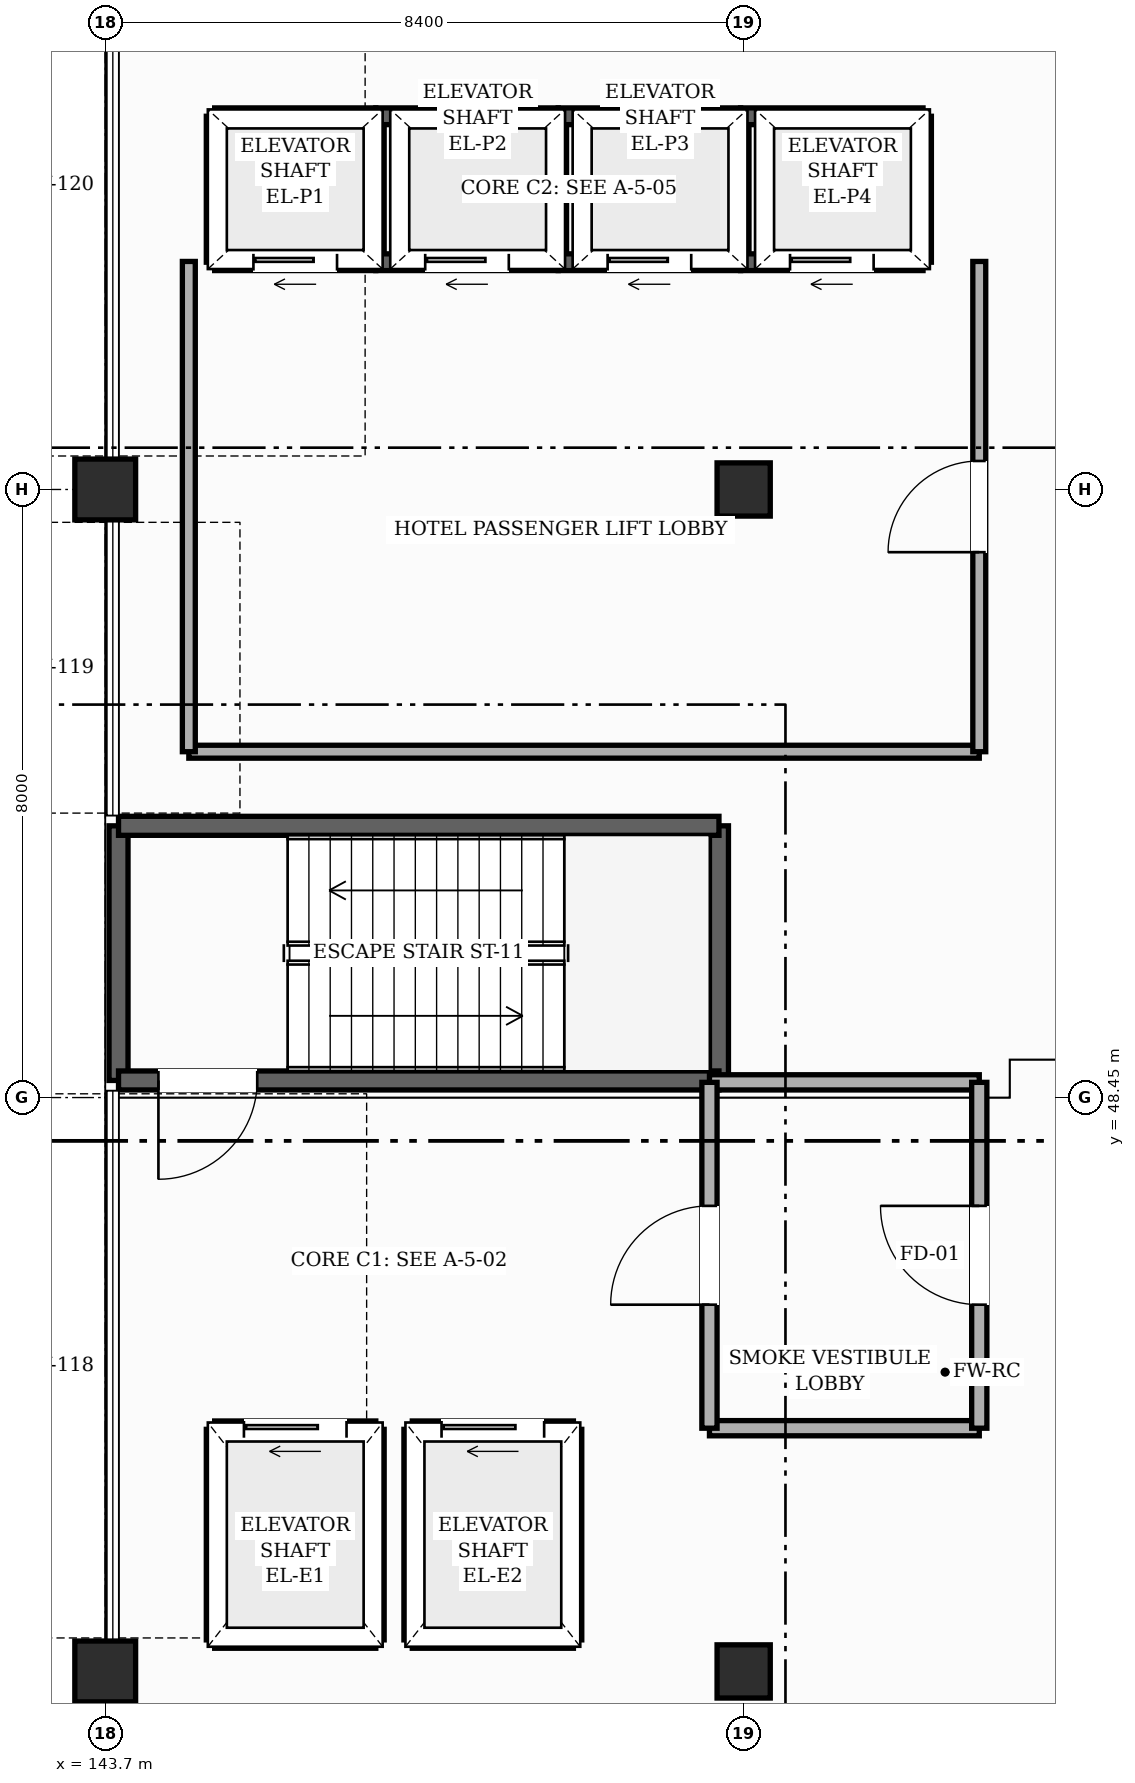
"""IFC4 building model, lengths in metres.
Left out: names, types, materials, properties, quantities, classifications, styles, units other than length and angle.
Written with IfcOpenShell. Run it as: python <this file> out.ifc"""

import sys

from ifc_helpers import new_model, si_unit, direction, frame, frame_2d, origin, origin_2d, place, context, subcontext, project, spatial, rectangle, hollow_rectangle, extrude, element, fill, save


model = new_model("IFC4")
c1 = context("Model", 3, precision=1e-05, world=origin(), true_north=direction((0.0, 1.0)))
c2 = subcontext(c1, "Body", "Model", "MODEL_VIEW")
j1 = project(units=[si_unit("LENGTHUNIT", "METRE"), si_unit("PLANEANGLEUNIT", "RADIAN")], contexts=[c1])
p1 = place(None, origin())
s1 = spatial("IfcSite", under=j1, at=p1, CompositionType="ELEMENT")
p2 = place(p1, origin())
s2 = spatial("IfcBuilding", under=s1, at=p2, CompositionType="ELEMENT")
p3 = place(p2, frame((0.0, 0.0, 5.4)))
s3 = spatial("IfcBuildingStorey", under=s2, at=p3, CompositionType="ELEMENT", Elevation=5.4)
for number, where, z_axis, x_axis in (
    (1, (143.7, 40.9, 0.0), (0.0, 0.0, 1.0), (1.0, 0.0, 0.0)),
    (2, (143.7, 56.45, 0.0), (0.0, 0.0, 1.0), (1.0, 0.0, 0.0)),
):
    element("IfcColumn", number, at=place(p3, frame(where, z_axis=z_axis, x_axis=x_axis)), inside=s3, PredefinedType="COLUMN", context=c2, shape_type="SweptSolid", body=[
        extrude(hollow_rectangle(XDim=0.8, YDim=0.8, WallThickness=0.032, InnerFilletRadius=0.032, OuterFilletRadius=0.064, at=origin_2d()), origin(), (0.0, 0.0, 1.0), 4.8),
    ])
for number, where, z_axis, x_axis in (
    (3, (152.1, 40.9, 0.0), (0.0, 0.0, 1.0), (1.0, 0.0, 0.0)),
    (4, (152.1, 56.45, 0.0), (0.0, 0.0, 1.0), (1.0, 0.0, 0.0)),
):
    element("IfcColumn", number, at=place(p3, frame(where, z_axis=z_axis, x_axis=x_axis)), inside=s3, PredefinedType="COLUMN", context=c2, shape_type="SweptSolid", body=[
        extrude(hollow_rectangle(XDim=0.7, YDim=0.7, WallThickness=0.028, InnerFilletRadius=0.028, OuterFilletRadius=0.056, at=origin_2d()), origin(), (0.0, 0.0, 1.0), 4.8),
    ])
p4 = place(p3, frame((143.8, 40.0, 0.0), z_axis=(0.0, 0.0, 1.0), x_axis=(0.0, 1.0, 0.0)))
e5 = element("IfcWall", 5, at=p4, inside=s3, PredefinedType="SOLIDWALL", context=c2, shape_type="SweptSolid", body=[
    extrude(rectangle(XDim=0.5, YDim=0.24, at=frame_2d((0.25, 0.0))), origin(), (0.0, 0.0, 1.0), 3.825),
])
for number, where, z_axis, x_axis in (
    (6, (143.875, 48.675, 0.0), (0.0, 0.0, 1.0), (0.0, 1.0, 0.0)),
    (7, (151.775, 52.025, 0.0), (0.0, 0.0, 1.0), (0.0, -1.0, 0.0)),
):
    element("IfcWall", number, at=place(p3, frame(where, z_axis=z_axis, x_axis=x_axis)), inside=s3, PredefinedType="SHEAR", context=c2, shape_type="SweptSolid", body=[
        extrude(rectangle(XDim=3.35, YDim=0.25, at=frame_2d((1.675, 0.0))), origin(), (0.0, 0.0, 1.0), 4.55),
    ])
p5 = place(p3, frame((151.775, 48.675, 0.0), z_axis=(0.0, 0.0, 1.0), x_axis=(-1.0, 0.0, 0.0)))
e8 = element("IfcWall", 8, at=p5, inside=s3, PredefinedType="SHEAR", context=c2, shape_type="SweptSolid", body=[
    extrude(rectangle(XDim=7.9, YDim=0.25, at=frame_2d((3.95, 0.0))), origin(), (0.0, 0.0, 1.0), 4.55),
])
p6 = place(p5, frame((6.075, 0.0, 0.0)))
e9 = element("IfcOpeningElement", 9, at=p6, cuts=e8, PredefinedType="OPENING", context=c2, shape_type="SweptSolid", body=[
    extrude(rectangle(XDim=1.3, YDim=2.2, at=frame_2d((0.65, 1.1))), frame((0.0, 0.135, 0.0), z_axis=(0.0, -1.0, 0.0), x_axis=(1.0, 0.0, 0.0)), (0.0, 0.0, 1.0), 0.27),
])
p7 = place(p3, frame((143.875, 52.025, 0.0), z_axis=(0.0, 0.0, 1.0), x_axis=(1.0, 0.0, 0.0)))
e10 = element("IfcWall", 10, at=p7, inside=s3, PredefinedType="SHEAR", context=c2, shape_type="SweptSolid", body=[
    extrude(rectangle(XDim=7.9, YDim=0.25, at=frame_2d((3.95, 0.0))), origin(), (0.0, 0.0, 1.0), 4.55),
])
p8 = place(p3, frame((145.14, 44.085, 0.0), z_axis=(0.0, 0.0, 1.0), x_axis=(1.0, 0.0, 0.0)))
e11 = element("IfcWall", 11, at=p8, inside=s3, PredefinedType="SHEAR", context=c2, shape_type="SweptSolid", body=[
    extrude(rectangle(XDim=2.12, YDim=0.22, at=frame_2d((1.06, 0.0))), origin(), (0.0, 0.0, 1.0), 4.55),
])
p9 = place(p8, frame((0.385, 0.0, 0.0)))
e12 = element("IfcOpeningElement", 12, at=p9, cuts=e11, PredefinedType="OPENING", context=c2, shape_type="SweptSolid", body=[
    extrude(rectangle(XDim=1.35, YDim=2.3, at=frame_2d((0.675, 1.15))), frame((0.0, 0.12, 0.0), z_axis=(0.0, -1.0, 0.0), x_axis=(1.0, 0.0, 0.0)), (0.0, 0.0, 1.0), 0.24),
])
p10 = place(p3, frame((145.14, 41.315, 0.0), z_axis=(0.0, 0.0, 1.0), x_axis=(1.0, 0.0, 0.0)))
e13 = element("IfcWall", 13, at=p10, inside=s3, PredefinedType="SHEAR", context=c2, shape_type="SweptSolid", body=[
    extrude(rectangle(XDim=2.12, YDim=0.22, at=frame_2d((1.06, 0.0))), origin(), (0.0, 0.0, 1.0), 4.55),
])
for number, where, z_axis, x_axis in (
    (14, (147.26, 41.315, 0.0), (0.0, 0.0, 1.0), (0.0, 1.0, 0.0)),
    (15, (145.14, 41.315, 0.0), (0.0, 0.0, 1.0), (0.0, 1.0, 0.0)),
):
    element("IfcWall", number, at=place(p3, frame(where, z_axis=z_axis, x_axis=x_axis)), inside=s3, PredefinedType="SHEAR", context=c2, shape_type="SweptSolid", body=[
        extrude(rectangle(XDim=2.77, YDim=0.22, at=frame_2d((1.385, 0.0))), origin(), (0.0, 0.0, 1.0), 4.55),
    ])
p11 = place(p3, frame((147.74, 44.085, 0.0), z_axis=(0.0, 0.0, 1.0), x_axis=(1.0, 0.0, 0.0)))
e16 = element("IfcWall", 16, at=p11, inside=s3, PredefinedType="SHEAR", context=c2, shape_type="SweptSolid", body=[
    extrude(rectangle(XDim=2.12, YDim=0.22, at=frame_2d((1.06, 0.0))), origin(), (0.0, 0.0, 1.0), 4.55),
])
p12 = place(p11, frame((0.385, 0.0, 0.0)))
e17 = element("IfcOpeningElement", 17, at=p12, cuts=e16, PredefinedType="OPENING", context=c2, shape_type="SweptSolid", body=[
    extrude(rectangle(XDim=1.35, YDim=2.3, at=frame_2d((0.675, 1.15))), frame((0.0, 0.12, 0.0), z_axis=(0.0, -1.0, 0.0), x_axis=(1.0, 0.0, 0.0)), (0.0, 0.0, 1.0), 0.24),
])
p13 = place(p3, frame((147.74, 41.315, 0.0), z_axis=(0.0, 0.0, 1.0), x_axis=(1.0, 0.0, 0.0)))
e18 = element("IfcWall", 18, at=p13, inside=s3, PredefinedType="SHEAR", context=c2, shape_type="SweptSolid", body=[
    extrude(rectangle(XDim=2.12, YDim=0.22, at=frame_2d((1.06, 0.0))), origin(), (0.0, 0.0, 1.0), 4.55),
])
for number, where, z_axis, x_axis in (
    (19, (149.86, 41.315, 0.0), (0.0, 0.0, 1.0), (0.0, 1.0, 0.0)),
    (20, (147.74, 41.315, 0.0), (0.0, 0.0, 1.0), (0.0, 1.0, 0.0)),
):
    element("IfcWall", number, at=place(p3, frame(where, z_axis=z_axis, x_axis=x_axis)), inside=s3, PredefinedType="SHEAR", context=c2, shape_type="SweptSolid", body=[
        extrude(rectangle(XDim=2.77, YDim=0.22, at=frame_2d((1.385, 0.0))), origin(), (0.0, 0.0, 1.0), 4.55),
    ])
p14 = place(p3, frame((145.14, 61.36, 0.0), z_axis=(0.0, 0.0, 1.0), x_axis=(1.0, 0.0, 0.0)))
e21 = element("IfcWall", 21, at=p14, inside=s3, PredefinedType="SHEAR", context=c2, shape_type="SweptSolid", body=[
    extrude(rectangle(XDim=2.12, YDim=0.22, at=frame_2d((1.06, 0.0))), origin(), (0.0, 0.0, 1.0), 4.55),
])
p15 = place(p3, frame((145.14, 59.44, 0.0), z_axis=(0.0, 0.0, 1.0), x_axis=(1.0, 0.0, 0.0)))
e22 = element("IfcWall", 22, at=p15, inside=s3, PredefinedType="SHEAR", context=c2, shape_type="SweptSolid", body=[
    extrude(rectangle(XDim=2.12, YDim=0.22, at=frame_2d((1.06, 0.0))), origin(), (0.0, 0.0, 1.0), 4.55),
])
p16 = place(p15, frame((0.51, 0.0, 0.0)))
e23 = element("IfcOpeningElement", 23, at=p16, cuts=e22, PredefinedType="OPENING", context=c2, shape_type="SweptSolid", body=[
    extrude(rectangle(XDim=1.1, YDim=2.2, at=frame_2d((0.55, 1.1))), frame((0.0, 0.12, 0.0), z_axis=(0.0, -1.0, 0.0), x_axis=(1.0, 0.0, 0.0)), (0.0, 0.0, 1.0), 0.24),
])
for number, where, z_axis, x_axis in (
    (24, (147.26, 59.44, 0.0), (0.0, 0.0, 1.0), (0.0, 1.0, 0.0)),
    (25, (145.14, 59.44, 0.0), (0.0, 0.0, 1.0), (0.0, 1.0, 0.0)),
):
    element("IfcWall", number, at=place(p3, frame(where, z_axis=z_axis, x_axis=x_axis)), inside=s3, PredefinedType="SHEAR", context=c2, shape_type="SweptSolid", body=[
        extrude(rectangle(XDim=1.92, YDim=0.22, at=frame_2d((0.96, 0.0))), origin(), (0.0, 0.0, 1.0), 4.55),
    ])
p17 = place(p3, frame((147.26, 61.36, 0.0), z_axis=(0.0, 0.0, 1.0), x_axis=(1.0, 0.0, 0.0)))
e26 = element("IfcWall", 26, at=p17, inside=s3, PredefinedType="SHEAR", context=c2, shape_type="SweptSolid", body=[
    extrude(rectangle(XDim=2.4, YDim=0.22, at=frame_2d((1.2, 0.0))), origin(), (0.0, 0.0, 1.0), 4.55),
])
p18 = place(p3, frame((147.26, 59.44, 0.0), z_axis=(0.0, 0.0, 1.0), x_axis=(1.0, 0.0, 0.0)))
e27 = element("IfcWall", 27, at=p18, inside=s3, PredefinedType="SHEAR", context=c2, shape_type="SweptSolid", body=[
    extrude(rectangle(XDim=2.4, YDim=0.22, at=frame_2d((1.2, 0.0))), origin(), (0.0, 0.0, 1.0), 4.55),
])
p19 = place(p18, frame((0.65, 0.0, 0.0)))
e28 = element("IfcOpeningElement", 28, at=p19, cuts=e27, PredefinedType="OPENING", context=c2, shape_type="SweptSolid", body=[
    extrude(rectangle(XDim=1.1, YDim=2.2, at=frame_2d((0.55, 1.1))), frame((0.0, 0.12, 0.0), z_axis=(0.0, -1.0, 0.0), x_axis=(1.0, 0.0, 0.0)), (0.0, 0.0, 1.0), 0.24),
])
p20 = place(p3, frame((149.66, 59.44, 0.0), z_axis=(0.0, 0.0, 1.0), x_axis=(0.0, 1.0, 0.0)))
e29 = element("IfcWall", 29, at=p20, inside=s3, PredefinedType="SHEAR", context=c2, shape_type="SweptSolid", body=[
    extrude(rectangle(XDim=1.92, YDim=0.22, at=frame_2d((0.96, 0.0))), origin(), (0.0, 0.0, 1.0), 4.55),
])
p21 = place(p3, frame((149.66, 61.36, 0.0), z_axis=(0.0, 0.0, 1.0), x_axis=(1.0, 0.0, 0.0)))
e30 = element("IfcWall", 30, at=p21, inside=s3, PredefinedType="SHEAR", context=c2, shape_type="SweptSolid", body=[
    extrude(rectangle(XDim=2.4, YDim=0.22, at=frame_2d((1.2, 0.0))), origin(), (0.0, 0.0, 1.0), 4.55),
])
p22 = place(p3, frame((149.66, 59.44, 0.0), z_axis=(0.0, 0.0, 1.0), x_axis=(1.0, 0.0, 0.0)))
e31 = element("IfcWall", 31, at=p22, inside=s3, PredefinedType="SHEAR", context=c2, shape_type="SweptSolid", body=[
    extrude(rectangle(XDim=2.4, YDim=0.22, at=frame_2d((1.2, 0.0))), origin(), (0.0, 0.0, 1.0), 4.55),
])
p23 = place(p22, frame((0.65, 0.0, 0.0)))
e32 = element("IfcOpeningElement", 32, at=p23, cuts=e31, PredefinedType="OPENING", context=c2, shape_type="SweptSolid", body=[
    extrude(rectangle(XDim=1.1, YDim=2.2, at=frame_2d((0.55, 1.1))), frame((0.0, 0.12, 0.0), z_axis=(0.0, -1.0, 0.0), x_axis=(1.0, 0.0, 0.0)), (0.0, 0.0, 1.0), 0.24),
])
p24 = place(p3, frame((152.06, 59.44, 0.0), z_axis=(0.0, 0.0, 1.0), x_axis=(0.0, 1.0, 0.0)))
e33 = element("IfcWall", 33, at=p24, inside=s3, PredefinedType="SHEAR", context=c2, shape_type="SweptSolid", body=[
    extrude(rectangle(XDim=1.92, YDim=0.22, at=frame_2d((0.96, 0.0))), origin(), (0.0, 0.0, 1.0), 4.55),
])
p25 = place(p3, frame((152.06, 61.36, 0.0), z_axis=(0.0, 0.0, 1.0), x_axis=(1.0, 0.0, 0.0)))
e34 = element("IfcWall", 34, at=p25, inside=s3, PredefinedType="SHEAR", context=c2, shape_type="SweptSolid", body=[
    extrude(rectangle(XDim=2.4, YDim=0.22, at=frame_2d((1.2, 0.0))), origin(), (0.0, 0.0, 1.0), 4.55),
])
p26 = place(p3, frame((152.06, 59.44, 0.0), z_axis=(0.0, 0.0, 1.0), x_axis=(1.0, 0.0, 0.0)))
e35 = element("IfcWall", 35, at=p26, inside=s3, PredefinedType="SHEAR", context=c2, shape_type="SweptSolid", body=[
    extrude(rectangle(XDim=2.4, YDim=0.22, at=frame_2d((1.2, 0.0))), origin(), (0.0, 0.0, 1.0), 4.55),
])
p27 = place(p26, frame((0.65, 0.0, 0.0)))
e36 = element("IfcOpeningElement", 36, at=p27, cuts=e35, PredefinedType="OPENING", context=c2, shape_type="SweptSolid", body=[
    extrude(rectangle(XDim=1.1, YDim=2.2, at=frame_2d((0.55, 1.1))), frame((0.0, 0.12, 0.0), z_axis=(0.0, -1.0, 0.0), x_axis=(1.0, 0.0, 0.0)), (0.0, 0.0, 1.0), 0.24),
])
p28 = place(p3, frame((154.46, 59.44, 0.0), z_axis=(0.0, 0.0, 1.0), x_axis=(0.0, 1.0, 0.0)))
e37 = element("IfcWall", 37, at=p28, inside=s3, PredefinedType="SHEAR", context=c2, shape_type="SweptSolid", body=[
    extrude(rectangle(XDim=1.92, YDim=0.22, at=frame_2d((0.96, 0.0))), origin(), (0.0, 0.0, 1.0), 4.55),
])
for number, where, z_axis, x_axis in (
    (38, (151.65, 44.1, 0.0), (0.0, 0.0, 1.0), (1.0, 0.0, 0.0)),
    (39, (151.65, 48.65, 0.0), (0.0, 0.0, 1.0), (1.0, 0.0, 0.0)),
):
    element("IfcWall", number, at=place(p3, frame(where, z_axis=z_axis, x_axis=x_axis)), inside=s3, PredefinedType="SOLIDWALL", context=c2, shape_type="SweptSolid", body=[
        extrude(rectangle(XDim=3.55, YDim=0.2, at=frame_2d((1.775, 0.0))), origin(), (0.0, 0.0, 1.0), 4.535),
    ])
p29 = place(p3, frame((144.8, 53.0, 0.0), z_axis=(0.0, 0.0, 1.0), x_axis=(1.0, 0.0, 0.0)))
e40 = element("IfcWall", 40, at=p29, inside=s3, PredefinedType="PARTITIONING", context=c2, shape_type="SweptSolid", body=[
    extrude(rectangle(XDim=10.4, YDim=0.17, at=frame_2d((5.2, 0.0))), origin(), (0.0, 0.0, 1.0), 4.535),
])
p30 = place(p3, frame((144.8, 53.0, 0.0), z_axis=(0.0, 0.0, 1.0), x_axis=(0.0, 1.0, 0.0)))
e41 = element("IfcWall", 41, at=p30, inside=s3, PredefinedType="PARTITIONING", context=c2, shape_type="SweptSolid", body=[
    extrude(rectangle(XDim=6.45, YDim=0.17, at=frame_2d((3.225, 0.0))), origin(), (0.0, 0.0, 1.0), 4.535),
])
p31 = place(p3, frame((151.65, 44.1, 0.0), z_axis=(0.0, 0.0, 1.0), x_axis=(0.0, 1.0, 0.0)))
e42 = element("IfcWall", 42, at=p31, inside=s3, PredefinedType="SOLIDWALL", context=c2, shape_type="SweptSolid", body=[
    extrude(rectangle(XDim=4.55, YDim=0.2, at=frame_2d((2.275, 0.0))), origin(), (0.0, 0.0, 1.0), 4.535),
])
p32 = place(p31, frame((1.625, 0.0, 0.0)))
e43 = element("IfcOpeningElement", 43, at=p32, cuts=e42, PredefinedType="OPENING", context=c2, shape_type="SweptSolid", body=[
    extrude(rectangle(XDim=1.3, YDim=2.2, at=frame_2d((0.65, 1.1))), frame((0.0, 0.11, 0.0), z_axis=(0.0, -1.0, 0.0), x_axis=(1.0, 0.0, 0.0)), (0.0, 0.0, 1.0), 0.22),
])
p33 = place(p3, frame((155.2, 44.1, 0.0), z_axis=(0.0, 0.0, 1.0), x_axis=(0.0, 1.0, 0.0)))
e44 = element("IfcWall", 44, at=p33, inside=s3, PredefinedType="SOLIDWALL", context=c2, shape_type="SweptSolid", body=[
    extrude(rectangle(XDim=4.55, YDim=0.2, at=frame_2d((2.275, 0.0))), origin(), (0.0, 0.0, 1.0), 4.535),
])
p34 = place(p33, frame((1.625, 0.0, 0.0)))
e45 = element("IfcOpeningElement", 45, at=p34, cuts=e44, PredefinedType="OPENING", context=c2, shape_type="SweptSolid", body=[
    extrude(rectangle(XDim=1.3, YDim=2.2, at=frame_2d((0.65, 1.1))), frame((0.0, 0.11, 0.0), z_axis=(0.0, -1.0, 0.0), x_axis=(1.0, 0.0, 0.0)), (0.0, 0.0, 1.0), 0.22),
])
p35 = place(p3, frame((155.2, 53.0, 0.0), z_axis=(0.0, 0.0, 1.0), x_axis=(0.0, 1.0, 0.0)))
e46 = element("IfcWall", 46, at=p35, inside=s3, PredefinedType="PARTITIONING", context=c2, shape_type="SweptSolid", body=[
    extrude(rectangle(XDim=6.45, YDim=0.17, at=frame_2d((3.225, 0.0))), origin(), (0.0, 0.0, 1.0), 4.535),
])
p36 = place(p35, frame((2.625, 0.0, 0.0)))
e47 = element("IfcOpeningElement", 47, at=p36, cuts=e46, PredefinedType="OPENING", context=c2, shape_type="SweptSolid", body=[
    extrude(rectangle(XDim=1.2, YDim=2.2, at=frame_2d((0.6, 1.1))), frame((0.0, 0.095, 0.0), z_axis=(0.0, -1.0, 0.0), x_axis=(1.0, 0.0, 0.0)), (0.0, 0.0, 1.0), 0.19),
])
p37 = place(p6, origin())
e48 = element("IfcDoor", 48, at=p37, inside=s3, OperationType="SINGLE_SWING_RIGHT", PredefinedType="DOOR", context=c2, shape_type="SweptSolid", body=[
    extrude(rectangle(XDim=1.3, YDim=2.2, at=frame_2d((0.65, 1.1))), frame((0.0, 0.025, 0.0), z_axis=(0.0, -1.0, 0.0), x_axis=(1.0, 0.0, 0.0)), (0.0, 0.0, 1.0), 0.05),
])
fill(e9, e48)
p38 = place(p9, origin())
e49 = element("IfcDoor", 49, at=p38, inside=s3, OperationType="SLIDING_TO_LEFT", PredefinedType="DOOR", context=c2, shape_type="SweptSolid", body=[
    extrude(rectangle(XDim=1.35, YDim=2.3, at=frame_2d((0.675, 1.15))), frame((0.0, 0.025, 0.0), z_axis=(0.0, -1.0, 0.0), x_axis=(1.0, 0.0, 0.0)), (0.0, 0.0, 1.0), 0.05),
])
fill(e12, e49)
p39 = place(p12, origin())
e50 = element("IfcDoor", 50, at=p39, inside=s3, OperationType="SLIDING_TO_LEFT", PredefinedType="DOOR", context=c2, shape_type="SweptSolid", body=[
    extrude(rectangle(XDim=1.35, YDim=2.3, at=frame_2d((0.675, 1.15))), frame((0.0, 0.025, 0.0), z_axis=(0.0, -1.0, 0.0), x_axis=(1.0, 0.0, 0.0)), (0.0, 0.0, 1.0), 0.05),
])
fill(e17, e50)
p40 = place(p16, origin())
e51 = element("IfcDoor", 51, at=p40, inside=s3, OperationType="SLIDING_TO_LEFT", PredefinedType="DOOR", context=c2, shape_type="SweptSolid", body=[
    extrude(rectangle(XDim=1.1, YDim=2.2, at=frame_2d((0.55, 1.1))), frame((0.0, 0.025, 0.0), z_axis=(0.0, -1.0, 0.0), x_axis=(1.0, 0.0, 0.0)), (0.0, 0.0, 1.0), 0.05),
])
fill(e23, e51)
p41 = place(p19, origin())
e52 = element("IfcDoor", 52, at=p41, inside=s3, OperationType="SLIDING_TO_LEFT", PredefinedType="DOOR", context=c2, shape_type="SweptSolid", body=[
    extrude(rectangle(XDim=1.1, YDim=2.2, at=frame_2d((0.55, 1.1))), frame((0.0, 0.025, 0.0), z_axis=(0.0, -1.0, 0.0), x_axis=(1.0, 0.0, 0.0)), (0.0, 0.0, 1.0), 0.05),
])
fill(e28, e52)
p42 = place(p23, origin())
e53 = element("IfcDoor", 53, at=p42, inside=s3, OperationType="SLIDING_TO_LEFT", PredefinedType="DOOR", context=c2, shape_type="SweptSolid", body=[
    extrude(rectangle(XDim=1.1, YDim=2.2, at=frame_2d((0.55, 1.1))), frame((0.0, 0.025, 0.0), z_axis=(0.0, -1.0, 0.0), x_axis=(1.0, 0.0, 0.0)), (0.0, 0.0, 1.0), 0.05),
])
fill(e32, e53)
p43 = place(p27, origin())
e54 = element("IfcDoor", 54, at=p43, inside=s3, OperationType="SLIDING_TO_LEFT", PredefinedType="DOOR", context=c2, shape_type="SweptSolid", body=[
    extrude(rectangle(XDim=1.1, YDim=2.2, at=frame_2d((0.55, 1.1))), frame((0.0, 0.025, 0.0), z_axis=(0.0, -1.0, 0.0), x_axis=(1.0, 0.0, 0.0)), (0.0, 0.0, 1.0), 0.05),
])
fill(e36, e54)
p44 = place(p32, origin())
e55 = element("IfcDoor", 55, at=p44, inside=s3, OperationType="SINGLE_SWING_LEFT", PredefinedType="DOOR", context=c2, shape_type="SweptSolid", body=[
    extrude(rectangle(XDim=1.3, YDim=2.2, at=frame_2d((0.65, 1.1))), frame((0.0, 0.025, 0.0), z_axis=(0.0, -1.0, 0.0), x_axis=(1.0, 0.0, 0.0)), (0.0, 0.0, 1.0), 0.05),
])
fill(e43, e55)
p45 = place(p34, origin())
e56 = element("IfcDoor", 56, at=p45, inside=s3, OperationType="SINGLE_SWING_RIGHT", PredefinedType="DOOR", context=c2, shape_type="SweptSolid", body=[
    extrude(rectangle(XDim=1.3, YDim=2.2, at=frame_2d((0.65, 1.1))), frame((0.0, 0.025, 0.0), z_axis=(0.0, -1.0, 0.0), x_axis=(1.0, 0.0, 0.0)), (0.0, 0.0, 1.0), 0.05),
])
fill(e45, e56)
p46 = place(p36, origin())
e57 = element("IfcDoor", 57, at=p46, inside=s3, OperationType="SINGLE_SWING_LEFT", PredefinedType="DOOR", context=c2, shape_type="SweptSolid", body=[
    extrude(rectangle(XDim=1.2, YDim=2.2, at=frame_2d((0.6, 1.1))), frame((0.0, 0.025, 0.0), z_axis=(0.0, -1.0, 0.0), x_axis=(1.0, 0.0, 0.0)), (0.0, 0.0, 1.0), 0.05),
])
fill(e47, e57)
save(model, sys.argv[1])
